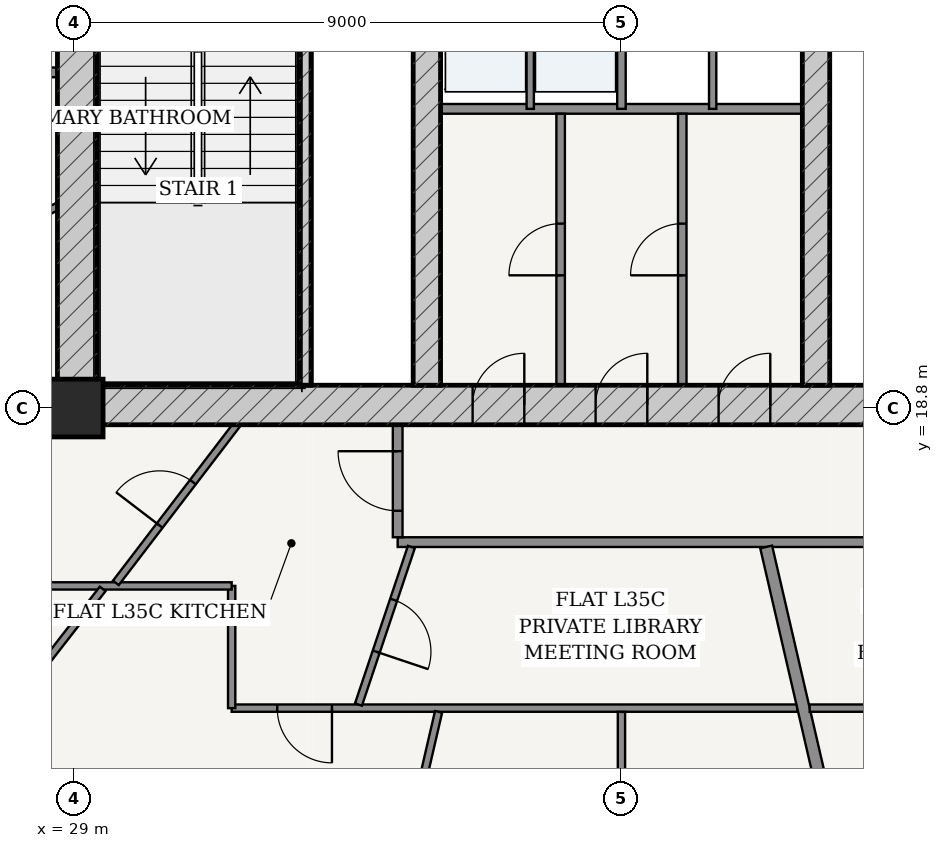
"""IFC4 building model, lengths in metres.
Left out: names, types, materials, properties, quantities, classifications, styles, units other than length and angle.
Written with IfcOpenShell. Run it as: python <this file> out.ifc"""

import sys

from ifc_helpers import new_model, si_unit, direction, frame, frame_2d, origin, origin_2d, place, context, subcontext, project, spatial, rectangle, extrude, source, transform, mapped, element, fill, save


model = new_model("IFC4")
c1 = context("Model", 3, precision=1e-05, world=origin(), true_north=direction((-0.2419218956, 0.970295726276)))
c2 = subcontext(c1, "Body", "Model", "MODEL_VIEW")
j1 = project(units=[si_unit("LENGTHUNIT", "METRE"), si_unit("PLANEANGLEUNIT", "RADIAN")], contexts=[c1])
p1 = place(None, origin())
s1 = spatial("IfcSite", under=j1, at=p1, CompositionType="ELEMENT")
p2 = place(p1, origin())
s2 = spatial("IfcBuilding", under=s1, at=p2, CompositionType="ELEMENT")
p3 = place(p2, frame((0.0, 0.0, 135.4)))
s3 = spatial("IfcBuildingStorey", under=s2, at=p3, CompositionType="ELEMENT", Elevation=135.4)
p4 = place(p3, frame((29.0, 18.8, 0.0), z_axis=(0.0, 0.0, 1.0), x_axis=(1.0, 0.0, 0.0)))
e1 = element("IfcColumn", 1, at=p4, inside=s3, PredefinedType="COLUMN", context=c2, shape_type="SweptSolid", body=[
    extrude(rectangle(XDim=0.95, YDim=0.95, at=origin_2d()), origin(), (0.0, 0.0, 1.0), 3.6),
])
p5 = place(p3, frame((28.725, 18.85, 0.0), z_axis=(0.0, 0.0, 1.0), x_axis=(1.0, 0.0, 0.0)))
e2 = element("IfcWall", 2, at=p5, inside=s3, PredefinedType="SHEAR", context=c2, shape_type="SweptSolid", body=[
    extrude(rectangle(XDim=18.55, YDim=0.65, at=frame_2d((9.275, 0.0))), origin(), (0.0, 0.0, 1.0), 3.33),
])
p6 = place(p5, frame((6.827, 0.0, 0.0)))
e3 = element("IfcOpeningElement", 3, at=p6, cuts=e2, PredefinedType="OPENING", context=c2, shape_type="SweptSolid", body=[
    extrude(rectangle(XDim=0.85, YDim=2.1, at=frame_2d((0.425, 1.05))), frame((0.0, 0.335, 0.0), z_axis=(0.0, -1.0, 0.0), x_axis=(1.0, 0.0, 0.0)), (0.0, 0.0, 1.0), 0.67),
])
p7 = place(p5, frame((8.85, 0.0, 0.0)))
e4 = element("IfcOpeningElement", 4, at=p7, cuts=e2, PredefinedType="OPENING", context=c2, shape_type="SweptSolid", body=[
    extrude(rectangle(XDim=0.85, YDim=2.1, at=frame_2d((0.425, 1.05))), frame((0.0, 0.335, 0.0), z_axis=(0.0, -1.0, 0.0), x_axis=(1.0, 0.0, 0.0)), (0.0, 0.0, 1.0), 0.67),
])
p8 = place(p5, frame((10.873, 0.0, 0.0)))
e5 = element("IfcOpeningElement", 5, at=p8, cuts=e2, PredefinedType="OPENING", context=c2, shape_type="SweptSolid", body=[
    extrude(rectangle(XDim=0.85, YDim=2.1, at=frame_2d((0.425, 1.05))), frame((0.0, 0.335, 0.0), z_axis=(0.0, -1.0, 0.0), x_axis=(1.0, 0.0, 0.0)), (0.0, 0.0, 1.0), 0.67),
])
p9 = place(p3, frame((29.05, 19.175, 0.0), z_axis=(0.0, 0.0, 1.0), x_axis=(0.0, 1.0, 0.0)))
e6 = element("IfcWall", 6, at=p9, inside=s3, PredefinedType="SHEAR", context=c2, shape_type="SweptSolid", body=[
    extrude(rectangle(XDim=15.25, YDim=0.65, at=frame_2d((7.625, 0.0))), origin(), (0.0, 0.0, 1.0), 3.33),
])
p10 = place(p9, frame((9.875, 0.0, 0.0)))
e7 = element("IfcOpeningElement", 7, at=p10, cuts=e6, PredefinedType="OPENING", context=c2, shape_type="SweptSolid", body=[
    extrude(rectangle(XDim=1.5, YDim=2.2, at=frame_2d((0.75, 1.1))), frame((0.0, 0.335, 0.0), z_axis=(0.0, -1.0, 0.0), x_axis=(1.0, 0.0, 0.0)), (0.0, 0.0, 1.0), 0.67),
])
p11 = place(p3, frame((32.795, 19.175, 0.0), z_axis=(0.0, 0.0, 1.0), x_axis=(0.0, 1.0, 0.0)))
e8 = element("IfcWall", 8, at=p11, inside=s3, PredefinedType="SOLIDWALL", context=c2, shape_type="SweptSolid", body=[
    extrude(rectangle(XDim=7.375, YDim=0.2, at=frame_2d((3.688, 0.0))), origin(), (0.0, 0.0, 1.0), 3.33),
])
p12 = place(p3, frame((34.8, 19.175, 0.0), z_axis=(0.0, 0.0, 1.0), x_axis=(0.0, 1.0, 0.0)))
e9 = element("IfcWall", 9, at=p12, inside=s3, PredefinedType="SHEAR", context=c2, shape_type="SweptSolid", body=[
    extrude(rectangle(XDim=15.25, YDim=0.45, at=frame_2d((7.625, 0.0))), origin(), (0.0, 0.0, 1.0), 3.33),
])
p13 = place(p12, frame((7.8, 0.0, 0.0)))
e10 = element("IfcOpeningElement", 10, at=p13, cuts=e9, PredefinedType="OPENING", context=c2, shape_type="SweptSolid", body=[
    extrude(rectangle(XDim=1.05, YDim=2.15, at=frame_2d((0.525, 1.075))), frame((0.0, 0.235, 0.0), z_axis=(0.0, -1.0, 0.0), x_axis=(1.0, 0.0, 0.0)), (0.0, 0.0, 1.0), 0.47),
])
p14 = place(p3, frame((41.2, 19.175, 0.0), z_axis=(0.0, 0.0, 1.0), x_axis=(0.0, 1.0, 0.0)))
e11 = element("IfcWall", 11, at=p14, inside=s3, PredefinedType="SHEAR", context=c2, shape_type="SweptSolid", body=[
    extrude(rectangle(XDim=15.25, YDim=0.45, at=frame_2d((7.625, 0.0))), origin(), (0.0, 0.0, 1.0), 3.33),
])
p15 = place(p14, frame((7.8, 0.0, 0.0)))
e12 = element("IfcOpeningElement", 12, at=p15, cuts=e11, PredefinedType="OPENING", context=c2, shape_type="SweptSolid", body=[
    extrude(rectangle(XDim=1.05, YDim=2.15, at=frame_2d((0.525, 1.075))), frame((0.0, 0.235, 0.0), z_axis=(0.0, -1.0, 0.0), x_axis=(1.0, 0.0, 0.0)), (0.0, 0.0, 1.0), 0.47),
])
p16 = place(p3, frame((35.025, 23.72, 0.0), z_axis=(0.0, 0.0, 1.0), x_axis=(1.0, 0.0, 0.0)))
e13 = element("IfcWall", 13, at=p16, inside=s3, PredefinedType="PARTITIONING", context=c2, shape_type="SweptSolid", body=[
    extrude(rectangle(XDim=5.95, YDim=0.16, at=frame_2d((2.975, 0.0))), origin(), (0.0, 0.0, 1.0), 3.33),
])
p17 = place(p3, frame((36.5, 23.72, 0.0), z_axis=(0.0, 0.0, 1.0), x_axis=(0.0, 1.0, 0.0)))
e14 = element("IfcWall", 14, at=p17, inside=s3, PredefinedType="PARTITIONING", context=c2, shape_type="SweptSolid", body=[
    extrude(rectangle(XDim=2.56, YDim=0.12, at=frame_2d((1.28, 0.0))), origin(), (0.0, 0.0, 1.0), 3.33),
])
p18 = place(p3, frame((38.0, 23.72, 0.0), z_axis=(0.0, 0.0, 1.0), x_axis=(0.0, 1.0, 0.0)))
e15 = element("IfcWall", 15, at=p18, inside=s3, PredefinedType="PARTITIONING", context=c2, shape_type="SweptSolid", body=[
    extrude(rectangle(XDim=2.56, YDim=0.14, at=frame_2d((1.28, 0.0))), origin(), (0.0, 0.0, 1.0), 3.33),
])
p19 = place(p3, frame((39.5, 23.72, 0.0), z_axis=(0.0, 0.0, 1.0), x_axis=(0.0, 1.0, 0.0)))
e16 = element("IfcWall", 16, at=p19, inside=s3, PredefinedType="PARTITIONING", context=c2, shape_type="SweptSolid", body=[
    extrude(rectangle(XDim=2.56, YDim=0.12, at=frame_2d((1.28, 0.0))), origin(), (0.0, 0.0, 1.0), 3.33),
])
p20 = place(p3, frame((37.0, 19.175, 0.0), z_axis=(0.0, 0.0, 1.0), x_axis=(0.0, 1.0, 0.0)))
e17 = element("IfcWall", 17, at=p20, inside=s3, PredefinedType="PARTITIONING", context=c2, shape_type="SweptSolid", body=[
    extrude(rectangle(XDim=4.465, YDim=0.14, at=frame_2d((2.232, 0.0))), origin(), (0.0, 0.0, 1.0), 3.33),
])
p21 = place(p20, frame((1.808, 0.0, 0.0)))
e18 = element("IfcOpeningElement", 18, at=p21, cuts=e17, PredefinedType="OPENING", context=c2, shape_type="SweptSolid", body=[
    extrude(rectangle(XDim=0.85, YDim=2.1, at=frame_2d((0.425, 1.05))), frame((0.0, 0.08, 0.0), z_axis=(0.0, -1.0, 0.0), x_axis=(1.0, 0.0, 0.0)), (0.0, 0.0, 1.0), 0.16),
])
p22 = place(p3, frame((39.0, 19.175, 0.0), z_axis=(0.0, 0.0, 1.0), x_axis=(0.0, 1.0, 0.0)))
e19 = element("IfcWall", 19, at=p22, inside=s3, PredefinedType="PARTITIONING", context=c2, shape_type="SweptSolid", body=[
    extrude(rectangle(XDim=4.465, YDim=0.14, at=frame_2d((2.232, 0.0))), origin(), (0.0, 0.0, 1.0), 3.33),
])
p23 = place(p22, frame((1.808, 0.0, 0.0)))
e20 = element("IfcOpeningElement", 20, at=p23, cuts=e19, PredefinedType="OPENING", context=c2, shape_type="SweptSolid", body=[
    extrude(rectangle(XDim=0.85, YDim=2.1, at=frame_2d((0.425, 1.05))), frame((0.0, 0.08, 0.0), z_axis=(0.0, -1.0, 0.0), x_axis=(1.0, 0.0, 0.0)), (0.0, 0.0, 1.0), 0.16),
])
p24 = place(p3, frame((26.795, 24.32, 0.0), z_axis=(0.0, 0.0, 1.0), x_axis=(1.0, 0.0, 0.0)))
e21 = element("IfcWall", 21, at=p24, inside=s3, PredefinedType="PARTITIONING", context=c2, shape_type="SweptSolid", body=[
    extrude(rectangle(XDim=1.93, YDim=0.16, at=frame_2d((0.965, 0.0))), origin(), (0.0, 0.0, 1.0), 3.33),
])
p25 = place(p3, frame((34.32, 16.595, 0.0), z_axis=(0.0, 0.0, 1.0), x_axis=(1.0, 0.0, 0.0)))
e22 = element("IfcWall", 22, at=p25, inside=s3, PredefinedType="PARTITIONING", context=c2, shape_type="SweptSolid", body=[
    extrude(rectangle(XDim=14.885, YDim=0.16, at=frame_2d((7.442, 0.0))), origin(), (0.0, 0.0, 1.0), 2.776),
])
p26 = place(p25, frame((12.174, 0.0, 0.0)))
e23 = element("IfcOpeningElement", 23, at=p26, cuts=e22, PredefinedType="OPENING", context=c2, shape_type="SweptSolid", body=[
    extrude(rectangle(XDim=0.98, YDim=2.2, at=frame_2d((0.49, 1.1))), frame((0.0, 0.09, 0.0), z_axis=(0.0, -1.0, 0.0), x_axis=(1.0, 0.0, 0.0)), (0.0, 0.0, 1.0), 0.18),
])
p27 = place(p3, frame((34.32, 16.675, 0.0), z_axis=(0.0, 0.0, 1.0), x_axis=(0.0, 1.0, 0.0)))
e24 = element("IfcWall", 24, at=p27, inside=s3, PredefinedType="PARTITIONING", context=c2, shape_type="SweptSolid", body=[
    extrude(rectangle(XDim=1.85, YDim=0.16, at=frame_2d((0.925, 0.0))), origin(), (0.0, 0.0, 1.0), 3.33),
])
p28 = place(p27, frame((0.435, 0.0, 0.0)))
e25 = element("IfcOpeningElement", 25, at=p28, cuts=e24, PredefinedType="OPENING", context=c2, shape_type="SweptSolid", body=[
    extrude(rectangle(XDim=0.98, YDim=2.2, at=frame_2d((0.49, 1.1))), frame((0.0, 0.09, 0.0), z_axis=(0.0, -1.0, 0.0), x_axis=(1.0, 0.0, 0.0)), (0.0, 0.0, 1.0), 0.18),
])
p29 = place(p3, frame((40.892, 13.865, 0.0), z_axis=(0.0, 0.0, 1.0), x_axis=(-1.0, 0.0, 0.0)))
e26 = element("IfcWall", 26, at=p29, inside=s3, PredefinedType="PARTITIONING", context=c2, shape_type="SweptSolid", body=[
    extrude(rectangle(XDim=9.302, YDim=0.12, at=frame_2d((4.651, 0.0))), origin(), (0.0, 0.0, 1.0), 2.776),
])
p30 = place(p29, frame((7.652, 0.0, 0.0)))
e27 = element("IfcOpeningElement", 27, at=p30, cuts=e26, PredefinedType="OPENING", context=c2, shape_type="SweptSolid", body=[
    extrude(rectangle(XDim=0.9, YDim=2.15, at=frame_2d((0.45, 1.075))), frame((0.0, 0.07, 0.0), z_axis=(0.0, -1.0, 0.0), x_axis=(1.0, 0.0, 0.0)), (0.0, 0.0, 1.0), 0.14),
])
p31 = place(p3, frame((31.59, 13.865, 0.0), z_axis=(0.0, 0.0, 1.0), x_axis=(0.0, 1.0, 0.0)))
e28 = element("IfcWall", 28, at=p31, inside=s3, PredefinedType="PARTITIONING", context=c2, shape_type="SweptSolid", body=[
    extrude(rectangle(XDim=2.01, YDim=0.12, at=frame_2d((1.005, 0.0))), origin(), (0.0, 0.0, 1.0), 3.005),
])
p32 = place(p3, frame((31.59, 15.875, 0.0), z_axis=(0.0, 0.0, 1.0), x_axis=(-1.0, 0.0, 0.0)))
e29 = element("IfcWall", 29, at=p32, inside=s3, PredefinedType="PARTITIONING", context=c2, shape_type="SweptSolid", body=[
    extrude(rectangle(XDim=5.515, YDim=0.12, at=frame_2d((2.758, 0.0))), origin(), (0.0, 0.0, 1.0), 2.776),
])
p33 = place(p3, frame((29.469, 15.826, 0.0), z_axis=(0.0, 0.0, 1.0), x_axis=(-0.61373942367, -0.789508657225, 0.0)))
e30 = element("IfcWall", 30, at=p33, inside=s3, PredefinedType="PARTITIONING", context=c2, shape_type="SweptSolid", body=[
    extrude(rectangle(XDim=7.898, YDim=0.12, at=frame_2d((3.949, 0.0))), origin(), (0.0, 0.0, 1.0), 2.776),
])
p34 = place(p33, frame((2.496, 0.0, 0.0)))
e31 = element("IfcOpeningElement", 31, at=p34, cuts=e30, PredefinedType="OPENING", context=c2, shape_type="SweptSolid", body=[
    extrude(rectangle(XDim=0.9, YDim=2.15, at=frame_2d((0.45, 1.075))), frame((0.0, 0.07, 0.0), z_axis=(0.0, -1.0, 0.0), x_axis=(1.0, 0.0, 0.0)), (0.0, 0.0, 1.0), 0.14),
])
p35 = place(p3, frame((34.992, 13.805, 0.0), z_axis=(0.0, 0.0, 1.0), x_axis=(-0.225447000045, -0.974255433739, 0.0)))
e32 = element("IfcWall", 32, at=p35, inside=s3, PredefinedType="PARTITIONING", context=c2, shape_type="SweptSolid", body=[
    extrude(rectangle(XDim=7.496, YDim=0.12, at=frame_2d((3.748, 0.0))), origin(), (0.0, 0.0, 1.0), 2.776),
])
p36 = place(p35, frame((2.289, 0.0, 0.0)))
e33 = element("IfcOpeningElement", 33, at=p36, cuts=e32, PredefinedType="OPENING", context=c2, shape_type="SweptSolid", body=[
    extrude(rectangle(XDim=0.9, YDim=2.15, at=frame_2d((0.45, 1.075))), frame((0.0, 0.07, 0.0), z_axis=(0.0, -1.0, 0.0), x_axis=(1.0, 0.0, 0.0)), (0.0, 0.0, 1.0), 0.14),
])
p37 = place(p3, frame((38.0, 13.803, 0.0), z_axis=(0.0, 0.0, 1.0), x_axis=(0.0, -1.0, 0.0)))
e34 = element("IfcWall", 34, at=p37, inside=s3, PredefinedType="PARTITIONING", context=c2, shape_type="SweptSolid", body=[
    extrude(rectangle(XDim=7.743, YDim=0.12, at=frame_2d((3.872, 0.0))), origin(), (0.0, 0.0, 1.0), 2.846),
])
p38 = place(p37, frame((3.421, 0.0, 0.0)))
e35 = element("IfcOpeningElement", 35, at=p38, cuts=e34, PredefinedType="OPENING", context=c2, shape_type="SweptSolid", body=[
    extrude(rectangle(XDim=0.9, YDim=2.15, at=frame_2d((0.45, 1.075))), frame((0.0, 0.07, 0.0), z_axis=(0.0, -1.0, 0.0), x_axis=(1.0, 0.0, 0.0)), (0.0, 0.0, 1.0), 0.14),
])
p39 = place(p3, frame((28.723, 22.114, 0.0), z_axis=(0.0, 0.0, 1.0), x_axis=(-0.892604354588, -0.450840843504, 0.0)))
e36 = element("IfcWall", 36, at=p39, inside=s3, PredefinedType="PARTITIONING", context=c2, shape_type="SweptSolid", body=[
    extrude(rectangle(XDim=2.905, YDim=0.12, at=frame_2d((1.452, 0.0))), origin(), (0.0, 0.0, 1.0), 3.33),
])
p40 = place(p39, frame((1.022, 0.0, 0.0)))
e37 = element("IfcOpeningElement", 37, at=p40, cuts=e36, PredefinedType="OPENING", context=c2, shape_type="SweptSolid", body=[
    extrude(rectangle(XDim=0.86, YDim=2.15, at=frame_2d((0.43, 1.075))), frame((0.0, 0.07, 0.0), z_axis=(0.0, -1.0, 0.0), x_axis=(1.0, 0.0, 0.0)), (0.0, 0.0, 1.0), 0.14),
])
p41 = place(p3, frame((31.674, 18.525, 0.0), z_axis=(0.0, 0.0, 1.0), x_axis=(-0.607372594471, -0.794417101708, 0.0)))
e38 = element("IfcWall", 38, at=p41, inside=s3, PredefinedType="PARTITIONING", context=c2, shape_type="SweptSolid", body=[
    extrude(rectangle(XDim=3.274, YDim=0.12, at=frame_2d((1.637, 0.0))), origin(), (0.0, 0.0, 1.0), 3.33),
])
p42 = place(p41, frame((1.187, 0.0, 0.0)))
e39 = element("IfcOpeningElement", 39, at=p42, cuts=e38, PredefinedType="OPENING", context=c2, shape_type="SweptSolid", body=[
    extrude(rectangle(XDim=0.9, YDim=2.15, at=frame_2d((0.45, 1.075))), frame((0.0, 0.07, 0.0), z_axis=(0.0, -1.0, 0.0), x_axis=(1.0, 0.0, 0.0)), (0.0, 0.0, 1.0), 0.14),
])
p43 = place(p3, frame((34.545, 16.515, 0.0), z_axis=(0.0, 0.0, 1.0), x_axis=(-0.318424178642, -0.947948333221, 0.0)))
e40 = element("IfcWall", 40, at=p43, inside=s3, PredefinedType="PARTITIONING", context=c2, shape_type="SweptSolid", body=[
    extrude(rectangle(XDim=2.733, YDim=0.12, at=frame_2d((1.367, 0.0))), origin(), (0.0, 0.0, 1.0), 3.33),
])
p44 = place(p43, frame((0.917, 0.0, 0.0)))
e41 = element("IfcOpeningElement", 41, at=p44, cuts=e40, PredefinedType="OPENING", context=c2, shape_type="SweptSolid", body=[
    extrude(rectangle(XDim=0.9, YDim=2.15, at=frame_2d((0.45, 1.075))), frame((0.0, 0.07, 0.0), z_axis=(0.0, -1.0, 0.0), x_axis=(1.0, 0.0, 0.0)), (0.0, 0.0, 1.0), 0.14),
])
p45 = place(p3, frame((40.38, 16.515, 0.0), z_axis=(0.0, 0.0, 1.0), x_axis=(0.225473598067, -0.974249278457, 0.0)))
e42 = element("IfcWall", 42, at=p45, inside=s3, PredefinedType="PARTITIONING", context=c2, shape_type="SweptSolid", body=[
    extrude(rectangle(XDim=10.278, YDim=0.2, at=frame_2d((5.139, 0.0))), origin(), (0.0, 0.0, 1.0), 2.776),
])
p46 = place(p3, frame((51.935, 13.865, 0.0), z_axis=(0.0, 0.0, 1.0), x_axis=(-1.0, 0.0, 0.0)))
e43 = element("IfcWall", 43, at=p46, inside=s3, PredefinedType="PARTITIONING", context=c2, shape_type="SweptSolid", body=[
    extrude(rectangle(XDim=10.84, YDim=0.12, at=frame_2d((5.42, 0.0))), origin(), (0.0, 0.0, 1.0), 2.776),
])
p47 = place(p46, frame((2.281, 0.0, 0.0)))
e44 = element("IfcOpeningElement", 44, at=p47, cuts=e43, PredefinedType="OPENING", context=c2, shape_type="SweptSolid", body=[
    extrude(rectangle(XDim=0.9, YDim=2.15, at=frame_2d((0.45, 1.075))), frame((0.0, 0.07, 0.0), z_axis=(0.0, -1.0, 0.0), x_axis=(1.0, 0.0, 0.0)), (0.0, 0.0, 1.0), 0.14),
])
m1 = source(origin(), c2, "Body", "SweptSolid", [
    extrude(rectangle(XDim=0.85, YDim=2.1, at=frame_2d((0.425, 1.05))), frame((0.0, 0.025, 0.0), z_axis=(0.0, -1.0, 0.0), x_axis=(1.0, 0.0, 0.0)), (0.0, 0.0, 1.0), 0.05),
])
p48 = place(p6, origin())
e45 = element("IfcDoor", 45, at=p48, inside=s3, OperationType="SINGLE_SWING_RIGHT", PredefinedType="DOOR", context=c2, shape_type="MappedRepresentation", body=[
    mapped(m1, transform((0.0, 0.0, 0.0), scale=1.0)),
])
fill(e3, e45)
p49 = place(p7, origin())
e46 = element("IfcDoor", 46, at=p49, inside=s3, OperationType="SINGLE_SWING_RIGHT", PredefinedType="DOOR", context=c2, shape_type="MappedRepresentation", body=[
    mapped(m1, transform((0.0, 0.0, 0.0), scale=1.0)),
])
fill(e4, e46)
p50 = place(p8, origin())
e47 = element("IfcDoor", 47, at=p50, inside=s3, OperationType="SINGLE_SWING_RIGHT", PredefinedType="DOOR", context=c2, shape_type="MappedRepresentation", body=[
    mapped(m1, transform((0.0, 0.0, 0.0), scale=1.0)),
])
fill(e5, e47)
p51 = place(p21, origin())
e48 = element("IfcDoor", 48, at=p51, inside=s3, OperationType="SINGLE_SWING_LEFT", PredefinedType="DOOR", context=c2, shape_type="MappedRepresentation", body=[
    mapped(m1, transform((0.0, 0.0, 0.0), scale=1.0)),
])
fill(e18, e48)
p52 = place(p23, origin())
e49 = element("IfcDoor", 49, at=p52, inside=s3, OperationType="SINGLE_SWING_LEFT", PredefinedType="DOOR", context=c2, shape_type="MappedRepresentation", body=[
    mapped(m1, transform((0.0, 0.0, 0.0), scale=1.0)),
])
fill(e20, e49)
m2 = source(origin(), c2, "Body", "SweptSolid", [
    extrude(rectangle(XDim=0.98, YDim=2.2, at=frame_2d((0.49, 1.1))), frame((0.0, 0.025, 0.0), z_axis=(0.0, -1.0, 0.0), x_axis=(1.0, 0.0, 0.0)), (0.0, 0.0, 1.0), 0.05),
])
p53 = place(p28, origin())
e50 = element("IfcDoor", 50, at=p53, inside=s3, OperationType="SINGLE_SWING_RIGHT", PredefinedType="DOOR", context=c2, shape_type="MappedRepresentation", body=[
    mapped(m2, transform((0.0, 0.0, 0.0), scale=1.0)),
])
fill(e25, e50)
m3 = source(origin(), c2, "Body", "SweptSolid", [
    extrude(rectangle(XDim=0.9, YDim=2.15, at=frame_2d((0.45, 1.075))), frame((0.0, 0.025, 0.0), z_axis=(0.0, -1.0, 0.0), x_axis=(1.0, 0.0, 0.0)), (0.0, 0.0, 1.0), 0.05),
])
p54 = place(p42, frame((0.9, 0.0, 0.0), z_axis=(0.0, 0.0, 1.0), x_axis=(-1.0, 0.0, 0.0)))
e51 = element("IfcDoor", 51, at=p54, inside=s3, OperationType="SINGLE_SWING_LEFT", PredefinedType="DOOR", context=c2, shape_type="MappedRepresentation", body=[
    mapped(m3, transform((0.0, 0.0, 0.0), scale=1.0)),
])
fill(e39, e51)
p55 = place(p44, origin())
e52 = element("IfcDoor", 52, at=p55, inside=s3, OperationType="SINGLE_SWING_RIGHT", PredefinedType="DOOR", context=c2, shape_type="MappedRepresentation", body=[
    mapped(m3, transform((0.0, 0.0, 0.0), scale=1.0)),
])
fill(e41, e52)
p56 = place(p30, origin())
e53 = element("IfcDoor", 53, at=p56, inside=s3, OperationType="SINGLE_SWING_LEFT", PredefinedType="DOOR", context=c2, shape_type="MappedRepresentation", body=[
    mapped(m3, transform((0.0, 0.0, 0.0), scale=1.0)),
])
fill(e27, e53)
save(model, sys.argv[1])
